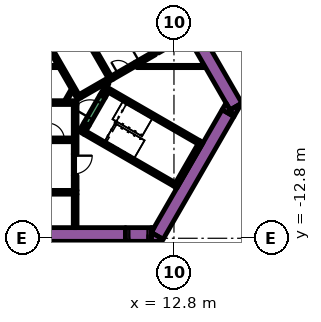
"""IFC4 building model, lengths in metres.
Left out: names, types, materials, properties, quantities, classifications, styles, units other than length and angle.
Written with IfcOpenShell. Run it as: python <this file> out.ifc"""

import sys

from ifc_helpers import new_model, si_unit, direction, frame, frame_2d, origin, place, context, subcontext, project, spatial, polyline, rectangle, outline, extrude, element, fill, save


model = new_model("IFC4")
c1 = context("Model", 3, precision=1e-05, world=origin(), true_north=direction((0.0, 1.0)))
c2 = subcontext(c1, "Body", "Model", "MODEL_VIEW")
j1 = project(units=[si_unit("LENGTHUNIT", "METRE"), si_unit("PLANEANGLEUNIT", "RADIAN")], contexts=[c1])
p1 = place(None, origin())
s1 = spatial("IfcSite", under=j1, at=p1, CompositionType="ELEMENT")
p2 = place(p1, origin())
s2 = spatial("IfcBuilding", under=s1, at=p2, CompositionType="ELEMENT")
p3 = place(p2, frame((0.0, 0.0, 16.2)))
s3 = spatial("IfcBuildingStorey", under=s2, at=p3, CompositionType="ELEMENT", Elevation=16.2)
p4 = place(p3, frame((6.776, 13.364, 0.0), z_axis=(0.0, 0.0, 1.0), x_axis=(0.500004177138, -0.8660229921, 0.0)))
e1 = element("IfcWall", 1, at=p4, inside=s3, PredefinedType="SOLIDWALL", context=c2, shape_type="SweptSolid", body=[
    extrude(rectangle(XDim=20.204, YDim=0.9, at=frame_2d((10.102, 0.0))), origin(), (0.0, 0.0, 1.0), 5.4),
])
p5 = place(p3, origin())
e2 = element("IfcWall", 2, at=p5, inside=s3, PredefinedType="SOLIDWALL", context=c2, shape_type="SweptSolid", body=[
    extrude(outline(polyline([(16.743, -4.8), (16.489, -4.36), (17.251, -3.92), (16.743, -4.8)])), origin(), (0.0, 0.0, 1.0), 5.4),
])
p6 = place(p3, frame((11.695, -12.644, 0.0), z_axis=(0.0, 0.0, 1.0), x_axis=(0.500010229568, 0.86601949766, 0.0)))
e3 = element("IfcWall", 3, at=p6, inside=s3, PredefinedType="SOLIDWALL", context=c2, shape_type="SweptSolid", body=[
    extrude(rectangle(XDim=9.326, YDim=0.9, at=frame_2d((4.663, 0.0))), origin(), (0.0, 0.0, 1.0), 5.4),
])
e4 = element("IfcWall", 4, at=p5, inside=s3, PredefinedType="SOLIDWALL", context=c2, shape_type="SweptSolid", body=[
    extrude(outline(polyline([(12.009, -13.0), (11.312, -13.0), (11.312, -12.425), (12.083, -12.871), (12.009, -13.0)])), origin(), (0.0, 0.0, 1.0), 5.4),
])
e5 = element("IfcWall", 5, at=p5, inside=s3, PredefinedType="SOLIDWALL", context=c2, shape_type="SweptSolid", body=[
    extrude(outline(polyline([(16.223, -3.9), (16.732, -4.78), (15.969, -4.34), (16.223, -3.9)])), origin(), (0.0, 0.0, 1.0), 5.4),
])
e6 = element("IfcWall", 6, at=p5, inside=s3, PredefinedType="SOLIDWALL", context=c2, shape_type="SweptSolid", body=[
    extrude(outline(polyline([(11.489, -12.1), (11.312, -12.407), (11.312, -12.1), (11.489, -12.1)])), origin(), (0.0, 0.0, 1.0), 5.4),
])
p7 = place(p3, frame((-12.019, -12.55, 0.0), z_axis=(0.0, 0.0, 1.0), x_axis=(1.0, 0.0, 0.0)))
e7 = element("IfcWall", 7, at=p7, inside=s3, PredefinedType="SOLIDWALL", context=c2, shape_type="SweptSolid", body=[
    extrude(rectangle(XDim=21.63, YDim=0.9, at=frame_2d((10.815, 0.0))), origin(), (0.0, 0.0, 1.0), 5.4),
])
p8 = place(p3, frame((12.885, -9.431, 0.0), z_axis=(0.0, 0.0, 1.0), x_axis=(0.500020560727, 0.866013532718, 0.0)))
e8 = element("IfcWall", 8, at=p8, inside=s3, PredefinedType="SOLIDWALL", context=c2, shape_type="SweptSolid", body=[
    extrude(rectangle(XDim=3.45, YDim=0.25, at=frame_2d((1.725, 0.0))), origin(), (0.0, 0.0, 1.0), 5.4),
])
p9 = place(p3, frame((12.84, -9.261, 0.0), z_axis=(0.0, 0.0, 1.0), x_axis=(-0.866013990052, 0.500019768644, 0.0)))
e9 = element("IfcWall", 9, at=p9, inside=s3, PredefinedType="SOLIDWALL", context=c2, shape_type="SweptSolid", body=[
    extrude(rectangle(XDim=6.8, YDim=0.25, at=frame_2d((3.4, 0.0))), origin(), (0.0, 0.0, 1.0), 5.4),
])
p10 = place(p3, frame((6.78, -5.906, 0.0), z_axis=(0.0, 0.0, 1.0), x_axis=(0.500223362819, 0.865896406789, 0.0)))
e10 = element("IfcWall", 10, at=p10, inside=s3, PredefinedType="SOLIDWALL", context=c2, shape_type="SweptSolid", body=[
    extrude(rectangle(XDim=0.675, YDim=0.25, at=frame_2d((0.337, 0.0))), origin(), (0.0, 0.0, 1.0), 5.4),
])
p11 = place(p3, frame((8.334, -2.964, 0.0), z_axis=(0.0, 0.0, 1.0), x_axis=(0.866016039709, -0.500016218704, 0.0)))
e11 = element("IfcWall", 11, at=p11, inside=s3, PredefinedType="SOLIDWALL", context=c2, shape_type="SweptSolid", body=[
    extrude(rectangle(XDim=7.05, YDim=0.25, at=frame_2d((3.525, 0.0))), origin(), (0.0, 0.0, 1.0), 5.4),
])
p12 = place(p3, frame((8.168, -3.503, 0.0), z_axis=(0.0, 0.0, 1.0), x_axis=(0.49972245349, 0.866185586049, 0.0)))
e12 = element("IfcWall", 12, at=p12, inside=s3, PredefinedType="SOLIDWALL", context=c2, shape_type="SweptSolid", body=[
    extrude(rectangle(XDim=0.425, YDim=0.25, at=frame_2d((0.212, 0.0))), origin(), (0.0, 0.0, 1.0), 5.4),
])
p13 = place(p3, frame((-6.425, -9.775, 0.0), z_axis=(0.0, 0.0, 1.0), x_axis=(1.0, 0.0, 0.0)))
e13 = element("IfcWall", 13, at=p13, inside=s3, PredefinedType="SOLIDWALL", context=c2, shape_type="SweptSolid", body=[
    extrude(rectangle(XDim=12.85, YDim=0.25, at=frame_2d((6.425, 0.0))), origin(), (0.0, 0.0, 1.0), 5.4),
])
p14 = place(p3, frame((-5.545, -3.875, 0.0), z_axis=(0.0, 0.0, 1.0), x_axis=(1.0, 0.0, 0.0)))
e14 = element("IfcWall", 14, at=p14, inside=s3, PredefinedType="SOLIDWALL", context=c2, shape_type="SweptSolid", body=[
    extrude(rectangle(XDim=11.97, YDim=0.25, at=frame_2d((5.985, 0.0))), origin(), (0.0, 0.0, 1.0), 5.4),
])
p15 = place(p3, frame((6.3, -7.27, 0.0), z_axis=(0.0, 0.0, 1.0), x_axis=(0.0, 1.0, 0.0)))
e15 = element("IfcWall", 15, at=p15, inside=s3, PredefinedType="SOLIDWALL", context=c2, shape_type="SweptSolid", body=[
    extrude(rectangle(XDim=3.27, YDim=0.25, at=frame_2d((1.635, 0.0))), origin(), (0.0, 0.0, 1.0), 5.4),
])
p16 = place(p3, frame((6.3, -8.672, 0.0), z_axis=(0.0, 0.0, 1.0), x_axis=(0.0, -1.0, 0.0)))
e16 = element("IfcWall", 16, at=p16, inside=s3, PredefinedType="SOLIDWALL", context=c2, shape_type="SweptSolid", body=[
    extrude(rectangle(XDim=0.978, YDim=0.25, at=frame_2d((0.489, 0.0))), origin(), (0.0, 0.0, 1.0), 5.4),
])
p17 = place(p3, frame((6.3, -9.9, 0.0), z_axis=(0.0, 0.0, 1.0), x_axis=(0.0, -1.0, 0.0)))
e17 = element("IfcWall", 17, at=p17, inside=s3, PredefinedType="SOLIDWALL", context=c2, shape_type="SweptSolid", body=[
    extrude(rectangle(XDim=2.2, YDim=0.25, at=frame_2d((1.1, 0.0))), origin(), (0.0, 0.0, 1.0), 5.4),
])
e18 = element("IfcWall", 18, at=p5, inside=s3, PredefinedType="SOLIDWALL", context=c2, shape_type="SweptSolid", body=[
    extrude(outline(polyline([(6.552, -3.348), (6.677, -3.564), (6.46, -3.689), (0.448, 6.725), (0.565, 6.725), (0.566, 6.725), (0.566, 6.725), (0.566, 6.875), (0.566, 6.875), (0.565, 6.875), (0.361, 6.875), (0.035, 7.439), (0.252, 7.564), (0.377, 7.348), (6.552, -3.348)])), origin(), (0.0, 0.0, 1.0), 5.4),
])
p18 = place(p3, frame((11.724, -0.506, 0.0), z_axis=(0.0, 0.0, 1.0), x_axis=(0.866008176907, 0.50002983664, 0.0)))
e19 = element("IfcWall", 19, at=p18, inside=s3, PredefinedType="SOLIDWALL", context=c2, shape_type="SweptSolid", body=[
    extrude(rectangle(XDim=2.2, YDim=0.25, at=frame_2d((1.1, 0.0))), origin(), (0.0, 0.0, 1.0), 5.4),
])
p19 = place(p3, frame((6.614, -3.456, 0.0), z_axis=(0.0, 0.0, 1.0), x_axis=(0.866031582473, 0.499989298045, 0.0)))
e20 = element("IfcWall", 20, at=p19, inside=s3, PredefinedType="SOLIDWALL", context=c2, shape_type="SweptSolid", body=[
    extrude(rectangle(XDim=2.455, YDim=0.25, at=frame_2d((1.228, 0.0))), origin(), (0.0, 0.0, 1.0), 5.4),
])
p20 = place(p3, frame((6.945, -5.222, 0.0), z_axis=(0.0, 0.0, 1.0), x_axis=(-0.499818422106, -0.866130212453, 0.0)))
e21 = element("IfcWall", 21, at=p20, inside=s3, PredefinedType="PARTITIONING", context=c2, shape_type="SweptSolid", body=[
    extrude(rectangle(XDim=0.514, YDim=0.15, at=frame_2d((0.257, 0.0))), origin(), (0.0, 0.0, 1.0), 4.1),
])
p21 = place(p3, frame((5.705, -3.718, 0.0), z_axis=(0.0, 0.0, 1.0), x_axis=(0.499962090823, 0.866047289552, 0.0)))
e22 = element("IfcWall", 22, at=p21, inside=s3, PredefinedType="PARTITIONING", context=c2, shape_type="SweptSolid", body=[
    extrude(rectangle(XDim=0.735, YDim=0.15, at=frame_2d((0.367, 0.0))), origin(), (0.0, 0.0, 1.0), 4.1),
])
p22 = place(p3, frame((8.459, -2.599, 0.0), z_axis=(0.0, 0.0, 1.0), x_axis=(-0.500041054325, -0.866001699761, 0.0)))
e23 = element("IfcWall", 23, at=p22, inside=s3, PredefinedType="PARTITIONING", context=c2, shape_type="SweptSolid", body=[
    extrude(rectangle(XDim=0.929, YDim=0.15, at=frame_2d((0.464, 0.0))), origin(), (0.0, 0.0, 1.0), 5.4),
])
p23 = place(p3, frame((10.362, -1.5, 0.0), z_axis=(0.0, 0.0, 1.0), x_axis=(1.0, 0.0, 0.0)))
e24 = element("IfcWall", 24, at=p23, inside=s3, PredefinedType="PARTITIONING", context=c2, shape_type="SweptSolid", body=[
    extrude(rectangle(XDim=4.439, YDim=0.15, at=frame_2d((2.22, 0.0))), origin(), (0.0, 0.0, 1.0), 4.1),
])
p24 = place(p3, frame((-4.2, -1.5, 0.0), z_axis=(0.0, 0.0, 1.0), x_axis=(1.0, 0.0, 0.0)))
e25 = element("IfcWall", 25, at=p24, inside=s3, PredefinedType="PARTITIONING", context=c2, shape_type="SweptSolid", body=[
    extrude(rectangle(XDim=9.359, YDim=0.15, at=frame_2d((4.68, 0.0))), origin(), (0.0, 0.0, 1.0), 4.1),
])
p25 = place(p3, frame((-6.175, -6.325, 0.0), z_axis=(0.0, 0.0, 1.0), x_axis=(1.0, 0.0, 0.0)))
e26 = element("IfcWall", 26, at=p25, inside=s3, PredefinedType="SOLIDWALL", context=c2, shape_type="SweptSolid", body=[
    extrude(rectangle(XDim=12.35, YDim=0.25, at=frame_2d((6.175, 0.0))), origin(), (0.0, 0.0, 1.0), 5.4),
])
p26 = place(p25, frame((3.205, 0.0, 0.0)))
e27 = element("IfcOpeningElement", 27, at=p26, cuts=e26, PredefinedType="OPENING", context=c2, shape_type="SweptSolid", body=[
    extrude(rectangle(XDim=0.9, YDim=2.1, at=frame_2d((0.45, 1.05))), frame((0.0, 0.135, 0.0), z_axis=(0.0, -1.0, 0.0), x_axis=(1.0, 0.0, 0.0)), (0.0, 0.0, 1.0), 0.27),
])
p27 = place(p25, frame((8.145, 0.0, 0.0)))
e28 = element("IfcOpeningElement", 28, at=p27, cuts=e26, PredefinedType="OPENING", context=c2, shape_type="SweptSolid", body=[
    extrude(rectangle(XDim=1.1, YDim=2.1, at=frame_2d((0.55, 1.05))), frame((0.0, 0.135, 0.0), z_axis=(0.0, -1.0, 0.0), x_axis=(1.0, 0.0, 0.0)), (0.0, 0.0, 1.0), 0.27),
])
p28 = place(p25, frame((10.665, 0.0, 0.0)))
e29 = element("IfcOpeningElement", 29, at=p28, cuts=e26, PredefinedType="OPENING", context=c2, shape_type="SweptSolid", body=[
    extrude(rectangle(XDim=1.1, YDim=2.1, at=frame_2d((0.55, 1.05))), frame((0.0, 0.135, 0.0), z_axis=(0.0, -1.0, 0.0), x_axis=(1.0, 0.0, 0.0)), (0.0, 0.0, 1.0), 0.27),
])
p29 = place(p3, frame((8.565, -2.185, 0.0), z_axis=(0.0, 0.0, 1.0), x_axis=(-0.499997954832, 0.866026584559, 0.0)))
e30 = element("IfcWall", 30, at=p29, inside=s3, PredefinedType="SOLIDWALL", context=c2, shape_type="SweptSolid", body=[
    extrude(rectangle(XDim=12.35, YDim=0.25, at=frame_2d((6.175, 0.0))), origin(), (0.0, 0.0, 1.0), 5.4),
])
p30 = place(p29, frame((5.725, 0.0, 0.0)))
e31 = element("IfcOpeningElement", 31, at=p30, cuts=e30, PredefinedType="OPENING", context=c2, shape_type="SweptSolid", body=[
    extrude(rectangle(XDim=0.9, YDim=2.1, at=frame_2d((0.45, 1.05))), frame((0.0, 0.135, 0.0), z_axis=(0.0, -1.0, 0.0), x_axis=(1.0, 0.0, 0.0)), (0.0, 0.0, 1.0), 0.27),
])
p31 = place(p3, frame((7.053, -5.284, 0.0), z_axis=(0.0, 0.0, 1.0), x_axis=(0.500078061341, 0.865980330357, 0.0)))
e32 = element("IfcWall", 32, at=p31, inside=s3, PredefinedType="SOLIDWALL", context=c2, shape_type="SweptSolid", body=[
    extrude(rectangle(XDim=2.1, YDim=0.4, at=frame_2d((1.05, 0.0))), origin(), (0.0, 0.0, 1.0), 5.4),
])
p32 = place(p31, frame((0.45, 0.0, 0.0)))
e33 = element("IfcOpeningElement", 33, at=p32, cuts=e32, PredefinedType="OPENING", context=c2, shape_type="SweptSolid", body=[
    extrude(rectangle(XDim=1.2, YDim=2.1, at=frame_2d((0.6, 1.05))), frame((0.0, 0.21, 0.0), z_axis=(0.0, -1.0, 0.0), x_axis=(1.0, 0.0, 0.0)), (0.0, 0.0, 1.0), 0.42),
])
p33 = place(p3, frame((8.74, -2.229, 0.0), z_axis=(0.0, 0.0, 1.0), x_axis=(0.865989075817, 0.500062916607, 0.0)))
e34 = element("IfcWall", 34, at=p33, inside=s3, PredefinedType="SOLIDWALL", context=c2, shape_type="SweptSolid", body=[
    extrude(rectangle(XDim=1.8, YDim=0.25, at=frame_2d((0.9, 0.0))), origin(), (0.0, 0.0, 1.0), 5.4),
])
p34 = place(p33, frame((0.45, 0.0, 0.0)))
e35 = element("IfcOpeningElement", 35, at=p34, cuts=e34, PredefinedType="OPENING", context=c2, shape_type="SweptSolid", body=[
    extrude(rectangle(XDim=0.9, YDim=2.1, at=frame_2d((0.45, 1.05))), frame((0.0, 0.135, 0.0), z_axis=(0.0, -1.0, 0.0), x_axis=(1.0, 0.0, 0.0)), (0.0, 0.0, 1.0), 0.27),
])
p35 = place(p3, frame((6.22, -7.266, 0.0), z_axis=(0.0, 0.0, 1.0), x_axis=(0.0, -1.0, 0.0)))
e36 = element("IfcWall", 36, at=p35, inside=s3, PredefinedType="PARTITIONING", context=c2, shape_type="SweptSolid", body=[
    extrude(rectangle(XDim=1.4, YDim=0.09, at=frame_2d((0.7, 0.0))), origin(), (0.0, 0.0, 1.0), 4.1),
])
p36 = place(p35, frame((0.1, 0.0, 0.0)))
e37 = element("IfcOpeningElement", 37, at=p36, cuts=e36, PredefinedType="OPENING", context=c2, shape_type="SweptSolid", body=[
    extrude(rectangle(XDim=1.2, YDim=2.1, at=frame_2d((0.6, 1.05))), frame((0.0, 0.055, 0.0), z_axis=(0.0, -1.0, 0.0), x_axis=(1.0, 0.0, 0.0)), (0.0, 0.0, 1.0), 0.11),
])
p37 = place(p3, frame((11.312, -12.55, 0.0), z_axis=(0.0, 0.0, 1.0), x_axis=(-1.0, 0.0, 0.0)))
e38 = element("IfcWall", 38, at=p37, inside=s3, PredefinedType="SOLIDWALL", context=c2, shape_type="SweptSolid", body=[
    extrude(rectangle(XDim=1.7, YDim=0.9, at=frame_2d((0.85, 0.0))), origin(), (0.0, 0.0, 1.0), 5.4),
])
p38 = place(p37, frame((0.25, 0.0, 0.0)))
e39 = element("IfcOpeningElement", 39, at=p38, cuts=e38, PredefinedType="OPENING", context=c2, shape_type="SweptSolid", body=[
    extrude(rectangle(XDim=1.2, YDim=2.1, at=frame_2d((0.6, 1.05))), frame((0.0, 0.46, 0.0), z_axis=(0.0, -1.0, 0.0), x_axis=(1.0, 0.0, 0.0)), (0.0, 0.0, 1.0), 0.92),
])
p39 = place(p3, frame((10.313, -1.32, 0.0), z_axis=(0.0, 0.0, 1.0), x_axis=(0.866034573852, 0.49998411664, 0.0)))
e40 = element("IfcWall", 40, at=p39, inside=s3, PredefinedType="SOLIDWALL", context=c2, shape_type="SweptSolid", body=[
    extrude(rectangle(XDim=1.4, YDim=0.25, at=frame_2d((0.7, 0.0))), origin(), (0.0, 0.0, 1.0), 5.4),
])
p40 = place(p39, frame((0.25, 0.0, 0.0)))
e41 = element("IfcOpeningElement", 41, at=p40, cuts=e40, PredefinedType="OPENING", context=c2, shape_type="SweptSolid", body=[
    extrude(rectangle(XDim=0.9, YDim=2.1, at=frame_2d((0.45, 1.05))), frame((0.0, 0.135, 0.0), z_axis=(0.0, -1.0, 0.0), x_axis=(1.0, 0.0, 0.0)), (0.0, 0.0, 1.0), 0.27),
])
p41 = place(p3, frame((38.25, -14.145, 0.0), z_axis=(0.0, 0.0, 1.0), x_axis=(-0.500000527961, 0.866025098966, 0.0)))
e42 = element("IfcWall", 42, at=p41, inside=s3, PredefinedType="SOLIDWALL", context=c2, shape_type="SweptSolid", body=[
    extrude(rectangle(XDim=62.75, YDim=0.25, at=frame_2d((31.375, 0.0))), origin(), (0.0, 0.0, 1.0), 5.0),
])
p42 = place(p28, origin())
e43 = element("IfcDoor", 43, at=p42, inside=s3, OperationType="DOUBLE_DOOR_SLIDING", PredefinedType="DOOR", context=c2, shape_type="SweptSolid", body=[
    extrude(rectangle(XDim=1.1, YDim=2.1, at=frame_2d((0.55, 1.05))), frame((0.0, 0.025, 0.0), z_axis=(0.0, -1.0, 0.0), x_axis=(1.0, 0.0, 0.0)), (0.0, 0.0, 1.0), 0.05),
])
fill(e29, e43)
p43 = place(p32, origin())
e44 = element("IfcDoor", 44, at=p43, inside=s3, OperationType="SINGLE_SWING_LEFT", PredefinedType="DOOR", context=c2, shape_type="SweptSolid", body=[
    extrude(rectangle(XDim=1.2, YDim=2.1, at=frame_2d((0.6, 1.05))), frame((0.0, 0.025, 0.0), z_axis=(0.0, -1.0, 0.0), x_axis=(1.0, 0.0, 0.0)), (0.0, 0.0, 1.0), 0.05),
])
fill(e33, e44)
p44 = place(p34, origin())
e45 = element("IfcDoor", 45, at=p44, inside=s3, OperationType="SINGLE_SWING_LEFT", PredefinedType="DOOR", context=c2, shape_type="SweptSolid", body=[
    extrude(rectangle(XDim=0.9, YDim=2.1, at=frame_2d((0.45, 1.05))), frame((0.0, 0.025, 0.0), z_axis=(0.0, -1.0, 0.0), x_axis=(1.0, 0.0, 0.0)), (0.0, 0.0, 1.0), 0.05),
])
fill(e35, e45)
p45 = place(p36, origin())
e46 = element("IfcDoor", 46, at=p45, inside=s3, OperationType="SINGLE_SWING_LEFT", PredefinedType="DOOR", context=c2, shape_type="SweptSolid", body=[
    extrude(rectangle(XDim=1.2, YDim=2.1, at=frame_2d((0.6, 1.05))), frame((0.0, 0.025, 0.0), z_axis=(0.0, -1.0, 0.0), x_axis=(1.0, 0.0, 0.0)), (0.0, 0.0, 1.0), 0.05),
])
fill(e37, e46)
p46 = place(p38, origin())
e47 = element("IfcDoor", 47, at=p46, inside=s3, OperationType="SINGLE_SWING_LEFT", PredefinedType="DOOR", context=c2, shape_type="SweptSolid", body=[
    extrude(rectangle(XDim=1.2, YDim=2.1, at=frame_2d((0.6, 1.05))), frame((0.0, 0.025, 0.0), z_axis=(0.0, -1.0, 0.0), x_axis=(1.0, 0.0, 0.0)), (0.0, 0.0, 1.0), 0.05),
])
fill(e39, e47)
p47 = place(p40, origin())
e48 = element("IfcDoor", 48, at=p47, inside=s3, OperationType="SINGLE_SWING_LEFT", PredefinedType="DOOR", context=c2, shape_type="SweptSolid", body=[
    extrude(rectangle(XDim=0.9, YDim=2.1, at=frame_2d((0.45, 1.05))), frame((0.0, 0.025, 0.0), z_axis=(0.0, -1.0, 0.0), x_axis=(1.0, 0.0, 0.0)), (0.0, 0.0, 1.0), 0.05),
])
fill(e41, e48)
save(model, sys.argv[1])
